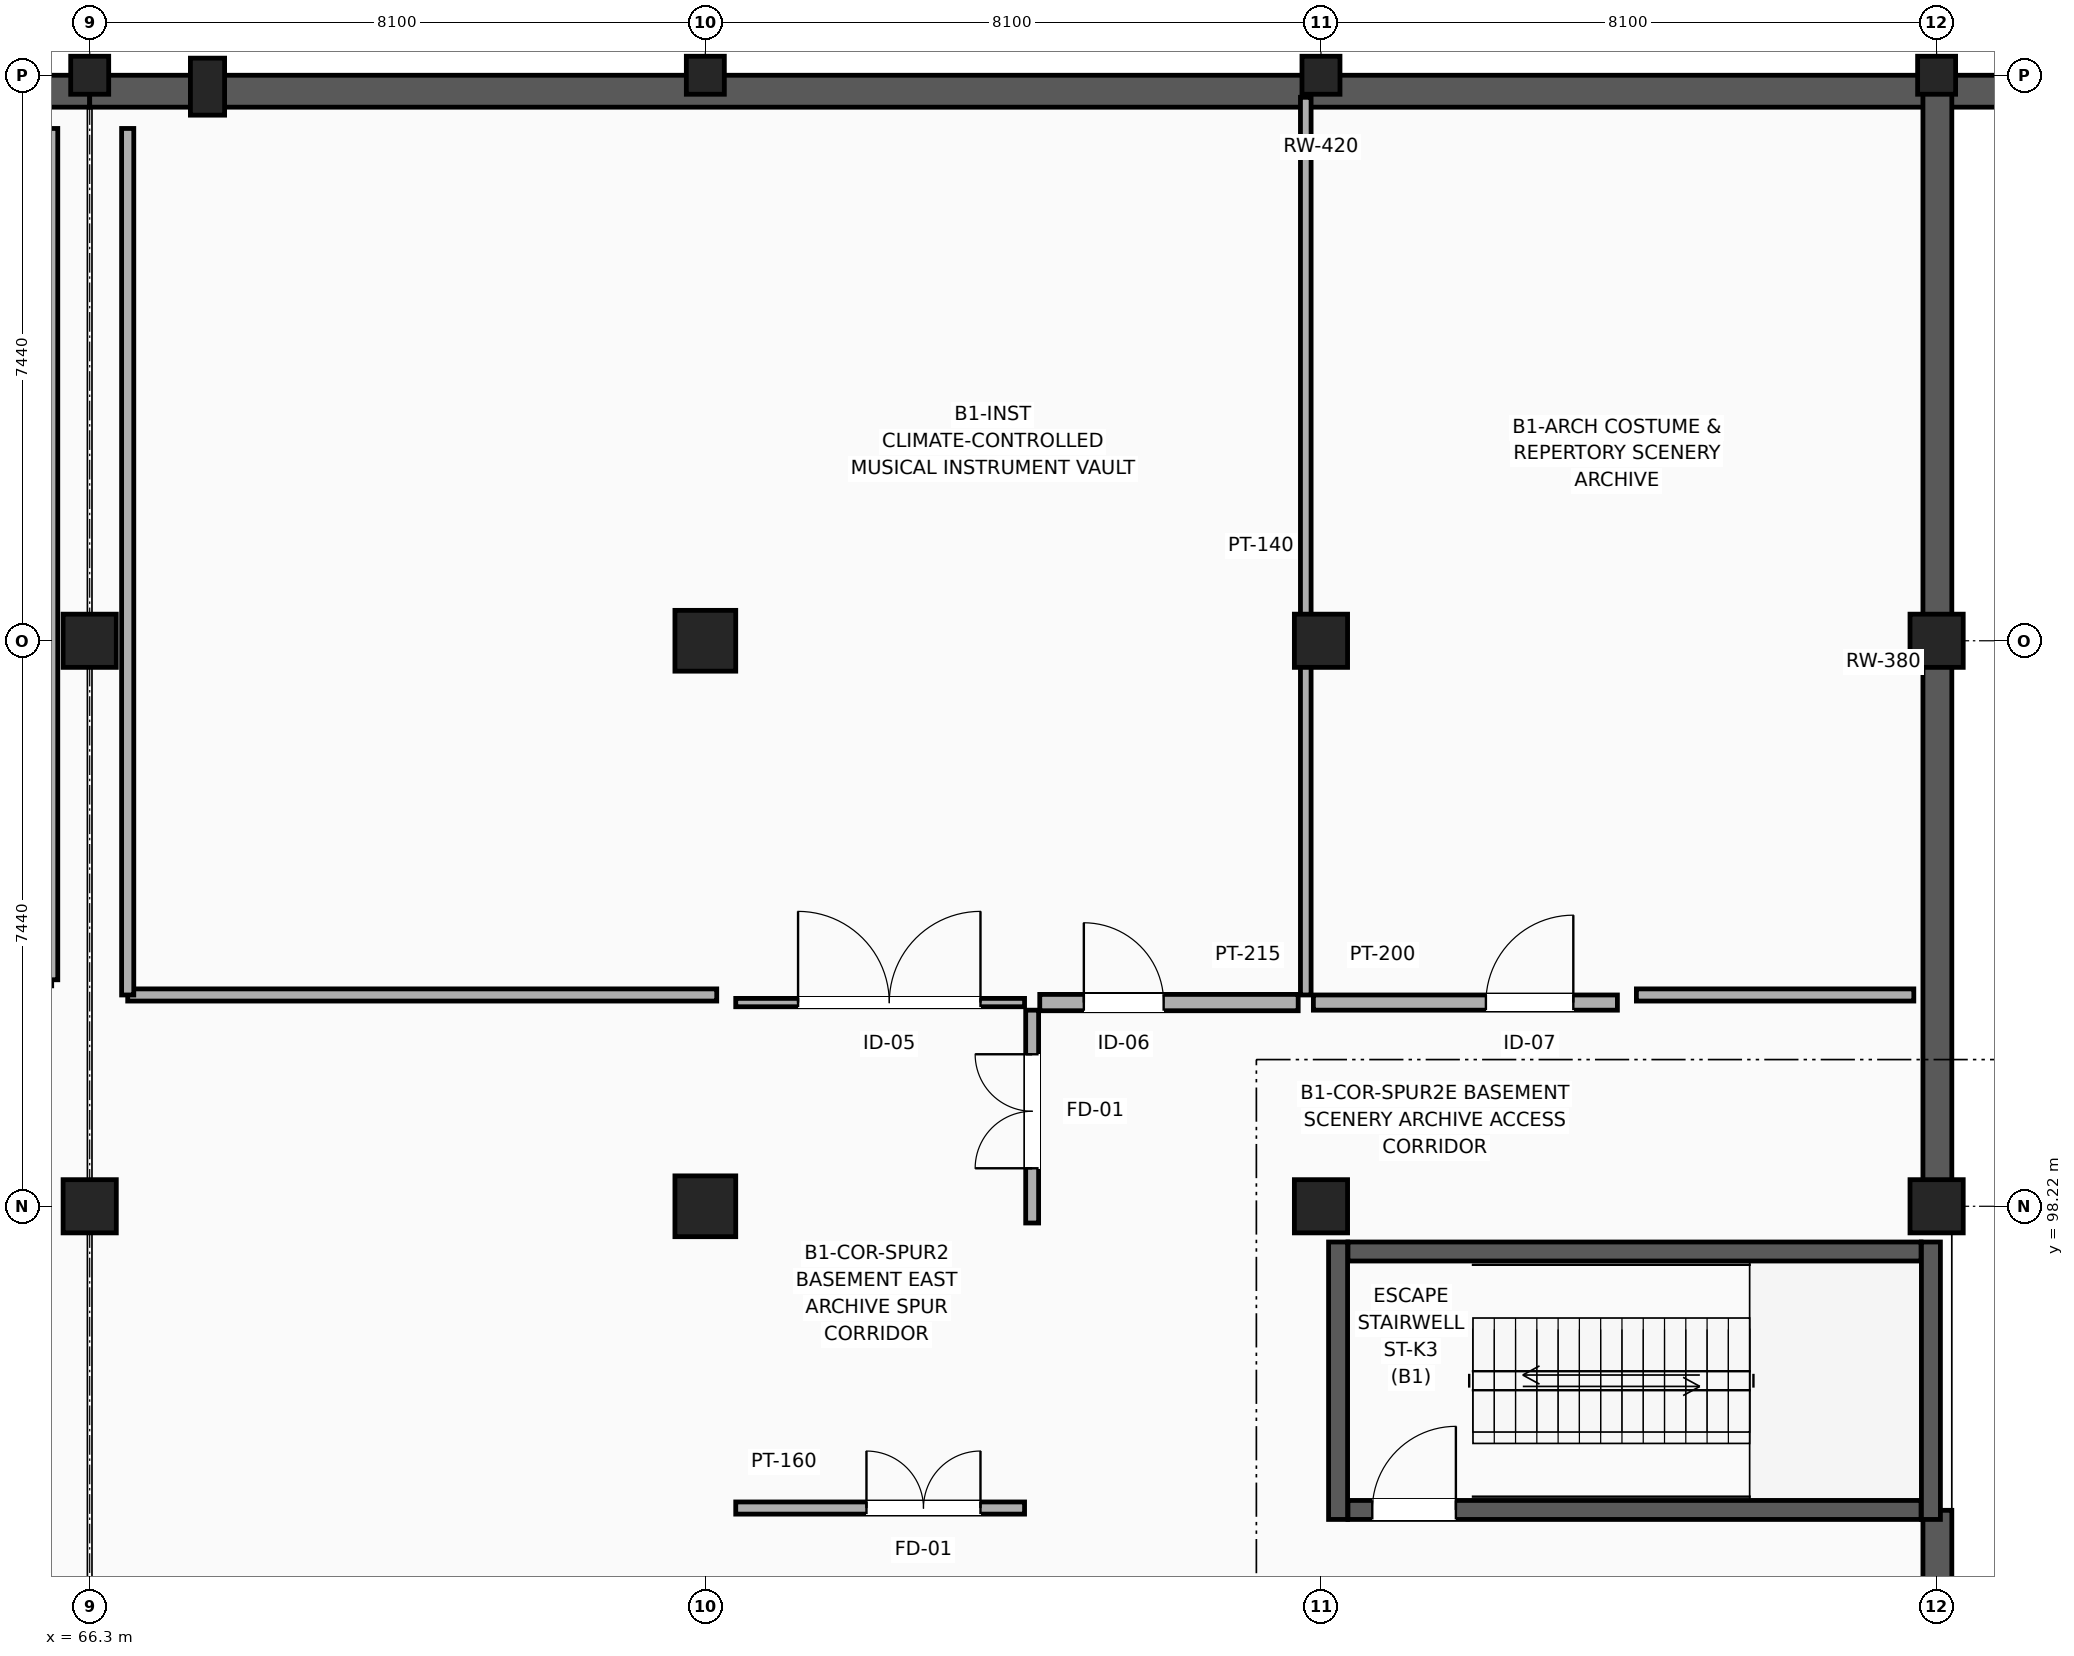
"""IFC4 building model, lengths in metres.
Left out: names, types, materials, properties, quantities, classifications, styles, units other than length and angle.
Written with IfcOpenShell. Run it as: python <this file> out.ifc"""

import sys

from ifc_helpers import new_model, si_unit, direction, frame, frame_2d, origin, origin_2d, place, context, subcontext, project, spatial, rectangle, extrude, element, fill, save


model = new_model("IFC4")
c1 = context("Model", 3, precision=1e-05, world=origin(), true_north=direction((0.0, 1.0)))
c2 = subcontext(c1, "Body", "Model", "MODEL_VIEW")
j1 = project(units=[si_unit("LENGTHUNIT", "METRE"), si_unit("PLANEANGLEUNIT", "RADIAN")], contexts=[c1])
p1 = place(None, origin())
s1 = spatial("IfcSite", under=j1, at=p1, CompositionType="ELEMENT")
p2 = place(p1, origin())
s2 = spatial("IfcBuilding", under=s1, at=p2, CompositionType="ELEMENT")
p3 = place(p2, frame((0.0, 0.0, -4.8)))
s3 = spatial("IfcBuildingStorey", under=s2, at=p3, CompositionType="ELEMENT", Elevation=-4.8)
p4 = place(p3, frame((67.85, 112.95, 0.0), z_axis=(0.0, 0.0, 1.0), x_axis=(1.0, 0.0, 0.0)))
e1 = element("IfcColumn", 1, at=p4, inside=s3, PredefinedType="PILASTER", context=c2, shape_type="SweptSolid", body=[
    extrude(rectangle(XDim=0.45, YDim=0.75, at=origin_2d()), origin(), (0.0, 0.0, 1.0), 4.8),
])
for number, where, z_axis, x_axis in (
    (2, (66.3, 98.22, 0.0), (0.0, 0.0, 1.0), (1.0, 0.0, 0.0)),
    (3, (66.3, 105.66, 0.0), (0.0, 0.0, 1.0), (1.0, 0.0, 0.0)),
):
    element("IfcColumn", number, at=place(p3, frame(where, z_axis=z_axis, x_axis=x_axis)), inside=s3, PredefinedType="COLUMN", context=c2, shape_type="SweptSolid", body=[
        extrude(rectangle(XDim=0.7, YDim=0.7, at=origin_2d()), origin(), (0.0, 0.0, 1.0), 4.8),
    ])
p5 = place(p3, frame((66.3, 113.1, 0.0), z_axis=(0.0, 0.0, 1.0), x_axis=(1.0, 0.0, 0.0)))
e4 = element("IfcColumn", 4, at=p5, inside=s3, PredefinedType="COLUMN", context=c2, shape_type="SweptSolid", body=[
    extrude(rectangle(XDim=0.5, YDim=0.5, at=origin_2d()), origin(), (0.0, 0.0, 1.0), 4.8),
])
for number, where, z_axis, x_axis in (
    (5, (74.4, 98.22, 0.0), (0.0, 0.0, 1.0), (1.0, 0.0, 0.0)),
    (6, (74.4, 105.66, 0.0), (0.0, 0.0, 1.0), (1.0, 0.0, 0.0)),
):
    element("IfcColumn", number, at=place(p3, frame(where, z_axis=z_axis, x_axis=x_axis)), inside=s3, PredefinedType="COLUMN", context=c2, shape_type="SweptSolid", body=[
        extrude(rectangle(XDim=0.8, YDim=0.8, at=origin_2d()), origin(), (0.0, 0.0, 1.0), 4.8),
    ])
p6 = place(p3, frame((74.4, 113.1, 0.0), z_axis=(0.0, 0.0, 1.0), x_axis=(1.0, 0.0, 0.0)))
e7 = element("IfcColumn", 7, at=p6, inside=s3, PredefinedType="COLUMN", context=c2, shape_type="SweptSolid", body=[
    extrude(rectangle(XDim=0.5, YDim=0.5, at=origin_2d()), origin(), (0.0, 0.0, 1.0), 4.8),
])
for number, where, z_axis, x_axis in (
    (8, (82.5, 98.22, 0.0), (0.0, 0.0, 1.0), (1.0, 0.0, 0.0)),
    (9, (82.5, 105.66, 0.0), (0.0, 0.0, 1.0), (1.0, 0.0, 0.0)),
):
    element("IfcColumn", number, at=place(p3, frame(where, z_axis=z_axis, x_axis=x_axis)), inside=s3, PredefinedType="COLUMN", context=c2, shape_type="SweptSolid", body=[
        extrude(rectangle(XDim=0.7, YDim=0.7, at=origin_2d()), origin(), (0.0, 0.0, 1.0), 4.8),
    ])
p7 = place(p3, frame((82.5, 113.1, 0.0), z_axis=(0.0, 0.0, 1.0), x_axis=(1.0, 0.0, 0.0)))
e10 = element("IfcColumn", 10, at=p7, inside=s3, PredefinedType="COLUMN", context=c2, shape_type="SweptSolid", body=[
    extrude(rectangle(XDim=0.5, YDim=0.5, at=origin_2d()), origin(), (0.0, 0.0, 1.0), 4.8),
])
for number, where, z_axis, x_axis in (
    (11, (90.6, 98.22, 0.0), (0.0, 0.0, 1.0), (1.0, 0.0, 0.0)),
    (12, (90.6, 105.66, 0.0), (0.0, 0.0, 1.0), (1.0, 0.0, 0.0)),
):
    element("IfcColumn", number, at=place(p3, frame(where, z_axis=z_axis, x_axis=x_axis)), inside=s3, PredefinedType="COLUMN", context=c2, shape_type="SweptSolid", body=[
        extrude(rectangle(XDim=0.7, YDim=0.7, at=origin_2d()), origin(), (0.0, 0.0, 1.0), 4.8),
    ])
p8 = place(p3, frame((90.6, 113.1, 0.0), z_axis=(0.0, 0.0, 1.0), x_axis=(1.0, 0.0, 0.0)))
e13 = element("IfcColumn", 13, at=p8, inside=s3, PredefinedType="COLUMN", context=c2, shape_type="SweptSolid", body=[
    extrude(rectangle(XDim=0.5, YDim=0.5, at=origin_2d()), origin(), (0.0, 0.0, 1.0), 4.8),
])
p9 = place(p3, frame((33.9, 112.89, 0.0), z_axis=(0.0, 0.0, 1.0), x_axis=(1.0, 0.0, 0.0)))
e14 = element("IfcWall", 14, at=p9, inside=s3, PredefinedType="USERDEFINED", context=c2, shape_type="SweptSolid", body=[
    extrude(rectangle(XDim=32.4, YDim=0.42, at=frame_2d((16.2, 0.0))), origin(), (0.0, 0.0, 1.0), 4.48),
])
p10 = place(p3, frame((66.3, 112.89, 0.0), z_axis=(0.0, 0.0, 1.0), x_axis=(1.0, 0.0, 0.0)))
e15 = element("IfcWall", 15, at=p10, inside=s3, PredefinedType="USERDEFINED", context=c2, shape_type="SweptSolid", body=[
    extrude(rectangle(XDim=32.4, YDim=0.42, at=frame_2d((16.2, 0.0))), origin(), (0.0, 0.0, 1.0), 4.48),
])
p11 = place(p3, frame((90.61, 83.34, 0.0), z_axis=(0.0, 0.0, 1.0), x_axis=(0.0, 1.0, 0.0)))
e16 = element("IfcWall", 16, at=p11, inside=s3, PredefinedType="USERDEFINED", context=c2, shape_type="SweptSolid", body=[
    extrude(rectangle(XDim=10.88, YDim=0.38, at=frame_2d((5.44, 0.0))), origin(), (0.0, 0.0, 1.0), 4.48),
])
p12 = place(p3, frame((90.61, 97.88, 0.0), z_axis=(0.0, 0.0, 1.0), x_axis=(0.0, 1.0, 0.0)))
e17 = element("IfcWall", 17, at=p12, inside=s3, PredefinedType="USERDEFINED", context=c2, shape_type="SweptSolid", body=[
    extrude(rectangle(XDim=15.01, YDim=0.38, at=frame_2d((7.505, 0.0))), origin(), (0.0, 0.0, 1.0), 4.48),
])
p13 = place(p3, frame((82.855, 94.225, 0.0), z_axis=(0.0, 0.0, 1.0), x_axis=(1.0, 0.0, 0.0)))
e18 = element("IfcWall", 18, at=p13, inside=s3, PredefinedType="SHEAR", context=c2, shape_type="SweptSolid", body=[
    extrude(rectangle(XDim=7.54, YDim=0.25, at=frame_2d((3.77, 0.0))), origin(), (0.0, 0.0, 1.0), 4.48),
])
p14 = place(p13, frame((0.32, 0.0, 0.0)))
e19 = element("IfcOpeningElement", 19, at=p14, cuts=e18, PredefinedType="OPENING", context=c2, shape_type="SweptSolid", body=[
    extrude(rectangle(XDim=1.1, YDim=2.2, at=frame_2d((0.55, 1.1))), frame((0.0, 0.135, 0.0), z_axis=(0.0, -1.0, 0.0), x_axis=(1.0, 0.0, 0.0)), (0.0, 0.0, 1.0), 0.27),
])
p15 = place(p3, frame((82.855, 97.625, 0.0), z_axis=(0.0, 0.0, 1.0), x_axis=(1.0, 0.0, 0.0)))
e20 = element("IfcWall", 20, at=p15, inside=s3, PredefinedType="SHEAR", context=c2, shape_type="SweptSolid", body=[
    extrude(rectangle(XDim=7.54, YDim=0.25, at=frame_2d((3.77, 0.0))), origin(), (0.0, 0.0, 1.0), 4.48),
])
for number, where, z_axis, x_axis in (
    (21, (82.725, 94.1, 0.0), (0.0, 0.0, 1.0), (0.0, 1.0, 0.0)),
    (22, (90.525, 94.1, 0.0), (0.0, 0.0, 1.0), (0.0, 1.0, 0.0)),
):
    element("IfcWall", number, at=place(p3, frame(where, z_axis=z_axis, x_axis=x_axis)), inside=s3, PredefinedType="SHEAR", context=c2, shape_type="SweptSolid", body=[
        extrude(rectangle(XDim=3.65, YDim=0.25, at=frame_2d((1.825, 0.0))), origin(), (0.0, 0.0, 1.0), 4.48),
    ])
p16 = place(p3, frame((74.8, 94.25, 0.0), z_axis=(0.0, 0.0, 1.0), x_axis=(1.0, 0.0, 0.0)))
e23 = element("IfcWall", 23, at=p16, inside=s3, PredefinedType="PARTITIONING", context=c2, shape_type="SweptSolid", body=[
    extrude(rectangle(XDim=3.8, YDim=0.16, at=frame_2d((1.9, 0.0))), origin(), (0.0, 0.0, 1.0), 4.012),
])
p17 = place(p16, frame((1.72, 0.0, 0.0)))
e24 = element("IfcOpeningElement", 24, at=p17, cuts=e23, PredefinedType="OPENING", context=c2, shape_type="SweptSolid", body=[
    extrude(rectangle(XDim=1.5, YDim=2.2, at=frame_2d((0.75, 1.1))), frame((0.0, 0.09, 0.0), z_axis=(0.0, -1.0, 0.0), x_axis=(1.0, 0.0, 0.0)), (0.0, 0.0, 1.0), 0.18),
])
p18 = place(p3, frame((78.7, 98.0, 0.0), z_axis=(0.0, 0.0, 1.0), x_axis=(0.0, 1.0, 0.0)))
e25 = element("IfcWall", 25, at=p18, inside=s3, PredefinedType="PARTITIONING", context=c2, shape_type="SweptSolid", body=[
    extrude(rectangle(XDim=2.8, YDim=0.17, at=frame_2d((1.4, 0.0))), origin(), (0.0, 0.0, 1.0), 3.512),
])
p19 = place(p18, frame((0.72, 0.0, 0.0)))
e26 = element("IfcOpeningElement", 26, at=p19, cuts=e25, PredefinedType="OPENING", context=c2, shape_type="SweptSolid", body=[
    extrude(rectangle(XDim=1.5, YDim=2.2, at=frame_2d((0.75, 1.1))), frame((0.0, 0.095, 0.0), z_axis=(0.0, -1.0, 0.0), x_axis=(1.0, 0.0, 0.0)), (0.0, 0.0, 1.0), 0.19),
])
p20 = place(p3, frame((74.8, 100.9, 0.0), z_axis=(0.0, 0.0, 1.0), x_axis=(1.0, 0.0, 0.0)))
e27 = element("IfcWall", 27, at=p20, inside=s3, PredefinedType="PARTITIONING", context=c2, shape_type="SweptSolid", body=[
    extrude(rectangle(XDim=3.8, YDim=0.11, at=frame_2d((1.9, 0.0))), origin(), (0.0, 0.0, 1.0), 4.192),
])
p21 = place(p20, frame((0.82, 0.0, 0.0)))
e28 = element("IfcOpeningElement", 28, at=p21, cuts=e27, PredefinedType="OPENING", context=c2, shape_type="SweptSolid", body=[
    extrude(rectangle(XDim=2.4, YDim=2.8, at=frame_2d((1.2, 1.4))), frame((0.0, 0.065, 0.0), z_axis=(0.0, -1.0, 0.0), x_axis=(1.0, 0.0, 0.0)), (0.0, 0.0, 1.0), 0.13),
])
p22 = place(p3, frame((78.8, 100.9, 0.0), z_axis=(0.0, 0.0, 1.0), x_axis=(1.0, 0.0, 0.0)))
e29 = element("IfcWall", 29, at=p22, inside=s3, PredefinedType="PARTITIONING", context=c2, shape_type="SweptSolid", body=[
    extrude(rectangle(XDim=3.4, YDim=0.215, at=frame_2d((1.7, 0.0))), origin(), (0.0, 0.0, 1.0), 4.162),
])
p23 = place(p22, frame((0.58, 0.0, 0.0)))
e30 = element("IfcOpeningElement", 30, at=p23, cuts=e29, PredefinedType="OPENING", context=c2, shape_type="SweptSolid", body=[
    extrude(rectangle(XDim=1.05, YDim=2.25, at=frame_2d((0.525, 1.125))), frame((0.0, 0.117, 0.0), z_axis=(0.0, -1.0, 0.0), x_axis=(1.0, 0.0, 0.0)), (0.0, 0.0, 1.0), 0.235),
])
p24 = place(p3, frame((82.4, 100.9, 0.0), z_axis=(0.0, 0.0, 1.0), x_axis=(1.0, 0.0, 0.0)))
e31 = element("IfcWall", 31, at=p24, inside=s3, PredefinedType="PARTITIONING", context=c2, shape_type="SweptSolid", body=[
    extrude(rectangle(XDim=4.0, YDim=0.2, at=frame_2d((2.0, 0.0))), origin(), (0.0, 0.0, 1.0), 3.412),
])
p25 = place(p24, frame((2.27, 0.0, 0.0)))
e32 = element("IfcOpeningElement", 32, at=p25, cuts=e31, PredefinedType="OPENING", context=c2, shape_type="SweptSolid", body=[
    extrude(rectangle(XDim=1.15, YDim=2.25, at=frame_2d((0.575, 1.125))), frame((0.0, 0.11, 0.0), z_axis=(0.0, -1.0, 0.0), x_axis=(1.0, 0.0, 0.0)), (0.0, 0.0, 1.0), 0.22),
])
p26 = place(p3, frame((82.3, 101.0, 0.0), z_axis=(0.0, 0.0, 1.0), x_axis=(0.0, 1.0, 0.0)))
e33 = element("IfcWall", 33, at=p26, inside=s3, PredefinedType="PARTITIONING", context=c2, shape_type="SweptSolid", body=[
    extrude(rectangle(XDim=11.81, YDim=0.14, at=frame_2d((5.905, 0.0))), origin(), (0.0, 0.0, 1.0), 3.412),
])
p27 = place(p3, frame((65.8, 101.2, 0.0), z_axis=(0.0, 0.0, 1.0), x_axis=(0.0, 1.0, 0.0)))
e34 = element("IfcWall", 34, at=p27, inside=s3, PredefinedType="PARTITIONING", context=c2, shape_type="SweptSolid", body=[
    extrude(rectangle(XDim=11.2, YDim=0.16, at=frame_2d((5.6, 0.0))), origin(), (0.0, 0.0, 1.0), 3.512),
])
p28 = place(p3, frame((66.8, 101.0, 0.0), z_axis=(0.0, 0.0, 1.0), x_axis=(1.0, 0.0, 0.0)))
e35 = element("IfcWall", 35, at=p28, inside=s3, PredefinedType="PARTITIONING", context=c2, shape_type="SweptSolid", body=[
    extrude(rectangle(XDim=7.75, YDim=0.16, at=frame_2d((3.875, 0.0))), origin(), (0.0, 0.0, 1.0), 3.712),
])
p29 = place(p3, frame((66.8, 101.0, 0.0), z_axis=(0.0, 0.0, 1.0), x_axis=(0.0, 1.0, 0.0)))
e36 = element("IfcWall", 36, at=p29, inside=s3, PredefinedType="PARTITIONING", context=c2, shape_type="SweptSolid", body=[
    extrude(rectangle(XDim=11.4, YDim=0.16, at=frame_2d((5.7, 0.0))), origin(), (0.0, 0.0, 1.0), 3.512),
])
p30 = place(p3, frame((86.65, 101.0, 0.0), z_axis=(0.0, 0.0, 1.0), x_axis=(1.0, 0.0, 0.0)))
e37 = element("IfcWall", 37, at=p30, inside=s3, PredefinedType="PARTITIONING", context=c2, shape_type="SweptSolid", body=[
    extrude(rectangle(XDim=3.65, YDim=0.16, at=frame_2d((1.825, 0.0))), origin(), (0.0, 0.0, 1.0), 4.132),
])
p31 = place(p14, origin())
e38 = element("IfcDoor", 38, at=p31, inside=s3, OperationType="SINGLE_SWING_RIGHT", PredefinedType="DOOR", context=c2, shape_type="SweptSolid", body=[
    extrude(rectangle(XDim=1.1, YDim=2.2, at=frame_2d((0.55, 1.1))), frame((0.0, 0.025, 0.0), z_axis=(0.0, -1.0, 0.0), x_axis=(1.0, 0.0, 0.0)), (0.0, 0.0, 1.0), 0.05),
])
fill(e19, e38)
p32 = place(p17, origin())
e39 = element("IfcDoor", 39, at=p32, inside=s3, OperationType="DOUBLE_DOOR_SINGLE_SWING", PredefinedType="DOOR", context=c2, shape_type="SweptSolid", body=[
    extrude(rectangle(XDim=1.5, YDim=2.2, at=frame_2d((0.75, 1.1))), frame((0.0, 0.025, 0.0), z_axis=(0.0, -1.0, 0.0), x_axis=(1.0, 0.0, 0.0)), (0.0, 0.0, 1.0), 0.05),
])
fill(e24, e39)
p33 = place(p19, origin())
e40 = element("IfcDoor", 40, at=p33, inside=s3, OperationType="DOUBLE_DOOR_SINGLE_SWING", PredefinedType="DOOR", context=c2, shape_type="SweptSolid", body=[
    extrude(rectangle(XDim=1.5, YDim=2.2, at=frame_2d((0.75, 1.1))), frame((0.0, 0.025, 0.0), z_axis=(0.0, -1.0, 0.0), x_axis=(1.0, 0.0, 0.0)), (0.0, 0.0, 1.0), 0.05),
])
fill(e26, e40)
p34 = place(p21, origin())
e41 = element("IfcDoor", 41, at=p34, inside=s3, OperationType="DOUBLE_DOOR_SINGLE_SWING", PredefinedType="DOOR", context=c2, shape_type="SweptSolid", body=[
    extrude(rectangle(XDim=2.4, YDim=2.8, at=frame_2d((1.2, 1.4))), frame((0.0, 0.025, 0.0), z_axis=(0.0, -1.0, 0.0), x_axis=(1.0, 0.0, 0.0)), (0.0, 0.0, 1.0), 0.05),
])
fill(e28, e41)
p35 = place(p23, origin())
e42 = element("IfcDoor", 42, at=p35, inside=s3, OperationType="SINGLE_SWING_LEFT", PredefinedType="DOOR", context=c2, shape_type="SweptSolid", body=[
    extrude(rectangle(XDim=1.05, YDim=2.25, at=frame_2d((0.525, 1.125))), frame((0.0, 0.025, 0.0), z_axis=(0.0, -1.0, 0.0), x_axis=(1.0, 0.0, 0.0)), (0.0, 0.0, 1.0), 0.05),
])
fill(e30, e42)
p36 = place(p25, origin())
e43 = element("IfcDoor", 43, at=p36, inside=s3, OperationType="SINGLE_SWING_RIGHT", PredefinedType="DOOR", context=c2, shape_type="SweptSolid", body=[
    extrude(rectangle(XDim=1.15, YDim=2.25, at=frame_2d((0.575, 1.125))), frame((0.0, 0.025, 0.0), z_axis=(0.0, -1.0, 0.0), x_axis=(1.0, 0.0, 0.0)), (0.0, 0.0, 1.0), 0.05),
])
fill(e32, e43)
save(model, sys.argv[1])
